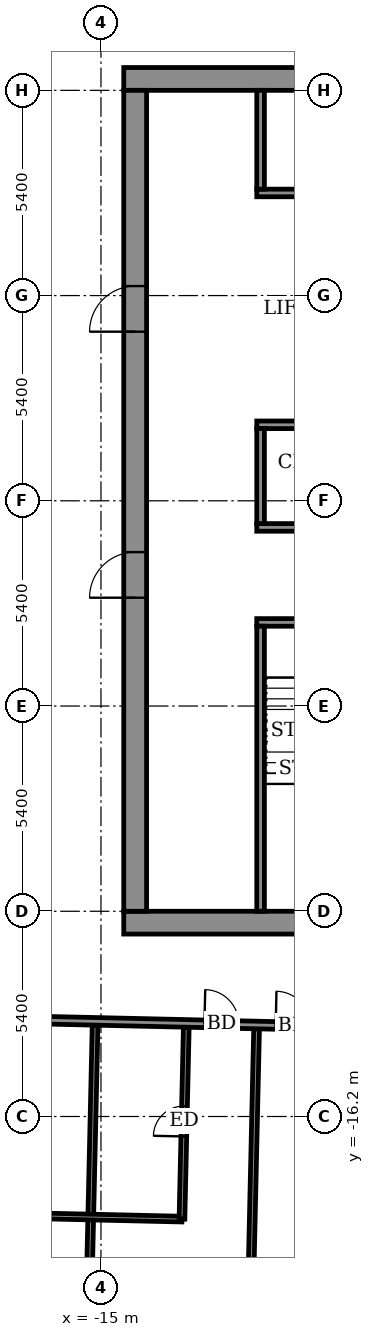
"""IFC4 building model, lengths in metres.
Left out: names, types, materials, properties, quantities, classifications, styles, units other than length and angle.
Written with IfcOpenShell. Run it as: python <this file> out.ifc"""

import sys

from ifc_helpers import new_model, si_unit, direction, frame, frame_2d, origin, place, context, subcontext, project, spatial, rectangle, extrude, element, fill, save


model = new_model("IFC4")
c1 = context("Model", 3, precision=1e-05, world=origin(), true_north=direction((0.0, 1.0)))
c2 = subcontext(c1, "Body", "Model", "MODEL_VIEW")
j1 = project(units=[si_unit("LENGTHUNIT", "METRE"), si_unit("PLANEANGLEUNIT", "RADIAN")], contexts=[c1])
p1 = place(None, origin())
s1 = spatial("IfcSite", under=j1, at=p1, CompositionType="ELEMENT")
p2 = place(p1, origin())
s2 = spatial("IfcBuilding", under=s1, at=p2, CompositionType="ELEMENT")
p3 = place(p2, frame((0.0, 0.0, 309.7)))
s3 = spatial("IfcBuildingStorey", under=s2, at=p3, CompositionType="ELEMENT", Elevation=309.7)
p4 = place(p3, frame((-15.414, -25.244, 0.0), z_axis=(0.0, 0.0, 1.0), x_axis=(0.022706391805, 0.999742176649, 0.0)))
e1 = element("IfcWall", 1, at=p4, inside=s3, PredefinedType="PARTITIONING", context=c2, shape_type="SweptSolid", body=[
    extrude(rectangle(XDim=11.451, YDim=0.15, at=frame_2d((5.726, 0.0))), origin(), (0.0, 0.0, 1.0), 2.5),
])
p5 = place(p3, frame((-11.165, -25.34, 0.0), z_axis=(0.0, 0.0, 1.0), x_axis=(0.022708327922, 0.999742132674, 0.0)))
e2 = element("IfcWall", 2, at=p5, inside=s3, PredefinedType="PARTITIONING", context=c2, shape_type="SweptSolid", body=[
    extrude(rectangle(XDim=11.45, YDim=0.15, at=frame_2d((5.725, 0.0))), origin(), (0.0, 0.0, 1.0), 2.5),
])
p6 = place(p3, frame((-17.668, -18.791, 0.0), z_axis=(0.0, 0.0, 1.0), x_axis=(0.999742701292, -0.022683280499, 0.0)))
e3 = element("IfcWall", 3, at=p6, inside=s3, PredefinedType="PARTITIONING", context=c2, shape_type="SweptSolid", body=[
    extrude(rectangle(XDim=4.8, YDim=0.15, at=frame_2d((2.4, 0.0))), origin(), (0.0, 0.0, 1.0), 3.05),
])
p7 = place(p3, frame((-12.869, -18.9, 0.0), z_axis=(0.0, 0.0, 1.0), x_axis=(0.022576449265, 0.999745119487, 0.0)))
e4 = element("IfcWall", 4, at=p7, inside=s3, PredefinedType="PARTITIONING", context=c2, shape_type="SweptSolid", body=[
    extrude(rectangle(XDim=5.05, YDim=0.15, at=frame_2d((2.525, 0.0))), origin(), (0.0, 0.0, 1.0), 3.05),
])
p8 = place(p7, frame((2.175, 0.0, 0.0)))
e5 = element("IfcOpeningElement", 5, at=p8, cuts=e4, PredefinedType="OPENING", context=c2, shape_type="SweptSolid", body=[
    extrude(rectangle(XDim=0.8, YDim=2.1, at=frame_2d((0.4, 1.05))), frame((0.0, 0.085, 0.0), z_axis=(0.0, -1.0, 0.0), x_axis=(1.0, 0.0, 0.0)), (0.0, 0.0, 1.0), 0.17),
])
p9 = place(p3, frame((-31.347, -13.329, 0.0), z_axis=(0.0, 0.0, 1.0), x_axis=(0.999742613079, -0.022687168058, 0.0)))
e6 = element("IfcWall", 6, at=p9, inside=s3, PredefinedType="PARTITIONING", context=c2, shape_type="SweptSolid", body=[
    extrude(rectangle(XDim=58.799, YDim=0.2, at=frame_2d((29.399, 0.0))), origin(), (0.0, 0.0, 1.0), 3.05),
])
p10 = place(p9, frame((1.35, 0.0, 0.0)))
e7 = element("IfcOpeningElement", 7, at=p10, cuts=e6, PredefinedType="OPENING", context=c2, shape_type="SweptSolid", body=[
    extrude(rectangle(XDim=1.0, YDim=2.1, at=frame_2d((0.5, 1.05))), frame((0.0, 0.11, 0.0), z_axis=(0.0, -1.0, 0.0), x_axis=(1.0, 0.0, 0.0)), (0.0, 0.0, 1.0), 0.22),
])
p11 = place(p9, frame((5.95, 0.0, 0.0)))
e8 = element("IfcOpeningElement", 8, at=p11, cuts=e6, PredefinedType="OPENING", context=c2, shape_type="SweptSolid", body=[
    extrude(rectangle(XDim=0.9, YDim=2.1, at=frame_2d((0.45, 1.05))), frame((0.0, 0.11, 0.0), z_axis=(0.0, -1.0, 0.0), x_axis=(1.0, 0.0, 0.0)), (0.0, 0.0, 1.0), 0.22),
])
p12 = place(p9, frame((10.575, 0.0, 0.0)))
e9 = element("IfcOpeningElement", 9, at=p12, cuts=e6, PredefinedType="OPENING", context=c2, shape_type="SweptSolid", body=[
    extrude(rectangle(XDim=0.9, YDim=2.1, at=frame_2d((0.45, 1.05))), frame((0.0, 0.11, 0.0), z_axis=(0.0, -1.0, 0.0), x_axis=(1.0, 0.0, 0.0)), (0.0, 0.0, 1.0), 0.22),
])
p13 = place(p9, frame((12.425, 0.0, 0.0)))
e10 = element("IfcOpeningElement", 10, at=p13, cuts=e6, PredefinedType="OPENING", context=c2, shape_type="SweptSolid", body=[
    extrude(rectangle(XDim=0.9, YDim=2.1, at=frame_2d((0.45, 1.05))), frame((0.0, 0.11, 0.0), z_axis=(0.0, -1.0, 0.0), x_axis=(1.0, 0.0, 0.0)), (0.0, 0.0, 1.0), 0.22),
])
p14 = place(p9, frame((19.075, 0.0, 0.0)))
e11 = element("IfcOpeningElement", 11, at=p14, cuts=e6, PredefinedType="OPENING", context=c2, shape_type="SweptSolid", body=[
    extrude(rectangle(XDim=0.9, YDim=2.1, at=frame_2d((0.45, 1.05))), frame((0.0, 0.11, 0.0), z_axis=(0.0, -1.0, 0.0), x_axis=(1.0, 0.0, 0.0)), (0.0, 0.0, 1.0), 0.22),
])
p15 = place(p9, frame((20.95, 0.0, 0.0)))
e12 = element("IfcOpeningElement", 12, at=p15, cuts=e6, PredefinedType="OPENING", context=c2, shape_type="SweptSolid", body=[
    extrude(rectangle(XDim=0.9, YDim=2.1, at=frame_2d((0.45, 1.05))), frame((0.0, 0.11, 0.0), z_axis=(0.0, -1.0, 0.0), x_axis=(1.0, 0.0, 0.0)), (0.0, 0.0, 1.0), 0.22),
])
p16 = place(p9, frame((27.625, 0.0, 0.0)))
e13 = element("IfcOpeningElement", 13, at=p16, cuts=e6, PredefinedType="OPENING", context=c2, shape_type="SweptSolid", body=[
    extrude(rectangle(XDim=0.9, YDim=2.1, at=frame_2d((0.45, 1.05))), frame((0.0, 0.11, 0.0), z_axis=(0.0, -1.0, 0.0), x_axis=(1.0, 0.0, 0.0)), (0.0, 0.0, 1.0), 0.22),
])
p17 = place(p9, frame((29.475, 0.0, 0.0)))
e14 = element("IfcOpeningElement", 14, at=p17, cuts=e6, PredefinedType="OPENING", context=c2, shape_type="SweptSolid", body=[
    extrude(rectangle(XDim=0.9, YDim=2.1, at=frame_2d((0.45, 1.05))), frame((0.0, 0.11, 0.0), z_axis=(0.0, -1.0, 0.0), x_axis=(1.0, 0.0, 0.0)), (0.0, 0.0, 1.0), 0.22),
])
p18 = place(p9, frame((36.125, 0.0, 0.0)))
e15 = element("IfcOpeningElement", 15, at=p18, cuts=e6, PredefinedType="OPENING", context=c2, shape_type="SweptSolid", body=[
    extrude(rectangle(XDim=0.9, YDim=2.1, at=frame_2d((0.45, 1.05))), frame((0.0, 0.11, 0.0), z_axis=(0.0, -1.0, 0.0), x_axis=(1.0, 0.0, 0.0)), (0.0, 0.0, 1.0), 0.22),
])
p19 = place(p9, frame((37.95, 0.0, 0.0)))
e16 = element("IfcOpeningElement", 16, at=p19, cuts=e6, PredefinedType="OPENING", context=c2, shape_type="SweptSolid", body=[
    extrude(rectangle(XDim=0.9, YDim=2.1, at=frame_2d((0.45, 1.05))), frame((0.0, 0.11, 0.0), z_axis=(0.0, -1.0, 0.0), x_axis=(1.0, 0.0, 0.0)), (0.0, 0.0, 1.0), 0.22),
])
p20 = place(p9, frame((44.6, 0.0, 0.0)))
e17 = element("IfcOpeningElement", 17, at=p20, cuts=e6, PredefinedType="OPENING", context=c2, shape_type="SweptSolid", body=[
    extrude(rectangle(XDim=0.9, YDim=2.1, at=frame_2d((0.45, 1.05))), frame((0.0, 0.11, 0.0), z_axis=(0.0, -1.0, 0.0), x_axis=(1.0, 0.0, 0.0)), (0.0, 0.0, 1.0), 0.22),
])
p21 = place(p9, frame((46.475, 0.0, 0.0)))
e18 = element("IfcOpeningElement", 18, at=p21, cuts=e6, PredefinedType="OPENING", context=c2, shape_type="SweptSolid", body=[
    extrude(rectangle(XDim=0.9, YDim=2.1, at=frame_2d((0.45, 1.05))), frame((0.0, 0.11, 0.0), z_axis=(0.0, -1.0, 0.0), x_axis=(1.0, 0.0, 0.0)), (0.0, 0.0, 1.0), 0.22),
])
p22 = place(p9, frame((55.925, 0.0, 0.0)))
e19 = element("IfcOpeningElement", 19, at=p22, cuts=e6, PredefinedType="OPENING", context=c2, shape_type="SweptSolid", body=[
    extrude(rectangle(XDim=1.0, YDim=2.1, at=frame_2d((0.5, 1.05))), frame((0.0, 0.11, 0.0), z_axis=(0.0, -1.0, 0.0), x_axis=(1.0, 0.0, 0.0)), (0.0, 0.0, 1.0), 0.22),
])
p23 = place(p9, frame((51.0, 0.0, 0.0)))
e20 = element("IfcOpeningElement", 20, at=p23, cuts=e6, PredefinedType="OPENING", context=c2, shape_type="SweptSolid", body=[
    extrude(rectangle(XDim=0.9, YDim=2.1, at=frame_2d((0.45, 1.05))), frame((0.0, 0.11, 0.0), z_axis=(0.0, -1.0, 0.0), x_axis=(1.0, 0.0, 0.0)), (0.0, 0.0, 1.0), 0.22),
])
for number, where, z_axis, x_axis in (
    (21, (-14.4, -11.1, 0.0), (0.0, 0.0, 1.0), (1.0, 0.0, 0.0)),
    (22, (-14.4, 11.1, 0.0), (0.0, 0.0, 1.0), (1.0, 0.0, 0.0)),
):
    element("IfcWall", number, at=place(p3, frame(where, z_axis=z_axis, x_axis=x_axis)), inside=s3, PredefinedType="SHEAR", context=c2, shape_type="SweptSolid", body=[
        extrude(rectangle(XDim=28.8, YDim=0.6, at=frame_2d((14.4, 0.0))), origin(), (0.0, 0.0, 1.0), 3.6),
    ])
p24 = place(p3, frame((-14.1, -10.8, 0.0), z_axis=(0.0, 0.0, 1.0), x_axis=(0.0, 1.0, 0.0)))
e23 = element("IfcWall", 23, at=p24, inside=s3, PredefinedType="SHEAR", context=c2, shape_type="SweptSolid", body=[
    extrude(rectangle(XDim=21.6, YDim=0.6, at=frame_2d((10.8, 0.0))), origin(), (0.0, 0.0, 1.0), 3.6),
])
p25 = place(p24, frame((8.25, 0.0, 0.0)))
e24 = element("IfcOpeningElement", 24, at=p25, cuts=e23, PredefinedType="OPENING", context=c2, shape_type="SweptSolid", body=[
    extrude(rectangle(XDim=1.2, YDim=2.1, at=frame_2d((0.6, 1.05))), frame((0.0, 0.31, 0.0), z_axis=(0.0, -1.0, 0.0), x_axis=(1.0, 0.0, 0.0)), (0.0, 0.0, 1.0), 0.62),
])
p26 = place(p24, frame((15.25, 0.0, 0.0)))
e25 = element("IfcOpeningElement", 25, at=p26, cuts=e23, PredefinedType="OPENING", context=c2, shape_type="SweptSolid", body=[
    extrude(rectangle(XDim=1.2, YDim=2.1, at=frame_2d((0.6, 1.05))), frame((0.0, 0.31, 0.0), z_axis=(0.0, -1.0, 0.0), x_axis=(1.0, 0.0, 0.0)), (0.0, 0.0, 1.0), 0.62),
])
p27 = place(p3, frame((-10.9, -3.2, 0.0), z_axis=(0.0, 0.0, 1.0), x_axis=(1.0, 0.0, 0.0)))
e26 = element("IfcWall", 26, at=p27, inside=s3, PredefinedType="SHEAR", context=c2, shape_type="SweptSolid", body=[
    extrude(rectangle(XDim=21.8, YDim=0.2, at=frame_2d((10.9, 0.0))), origin(), (0.0, 0.0, 1.0), 3.05),
])
p28 = place(p27, frame((1.075, 0.0, 0.0)))
e27 = element("IfcOpeningElement", 27, at=p28, cuts=e26, PredefinedType="OPENING", context=c2, shape_type="SweptSolid", body=[
    extrude(rectangle(XDim=1.1, YDim=2.1, at=frame_2d((0.55, 1.05))), frame((0.0, 0.11, 0.0), z_axis=(0.0, -1.0, 0.0), x_axis=(1.0, 0.0, 0.0)), (0.0, 0.0, 1.0), 0.22),
])
p29 = place(p27, frame((10.325, 0.0, 0.0)))
e28 = element("IfcOpeningElement", 28, at=p29, cuts=e26, PredefinedType="OPENING", context=c2, shape_type="SweptSolid", body=[
    extrude(rectangle(XDim=1.1, YDim=2.1, at=frame_2d((0.55, 1.05))), frame((0.0, 0.11, 0.0), z_axis=(0.0, -1.0, 0.0), x_axis=(1.0, 0.0, 0.0)), (0.0, 0.0, 1.0), 0.22),
])
p30 = place(p27, frame((19.625, 0.0, 0.0)))
e29 = element("IfcOpeningElement", 29, at=p30, cuts=e26, PredefinedType="OPENING", context=c2, shape_type="SweptSolid", body=[
    extrude(rectangle(XDim=1.1, YDim=2.1, at=frame_2d((0.55, 1.05))), frame((0.0, 0.11, 0.0), z_axis=(0.0, -1.0, 0.0), x_axis=(1.0, 0.0, 0.0)), (0.0, 0.0, 1.0), 0.22),
])
p31 = place(p27, frame((5.7, 0.0, 0.0)))
e30 = element("IfcOpeningElement", 30, at=p31, cuts=e26, PredefinedType="OPENING", context=c2, shape_type="SweptSolid", body=[
    extrude(rectangle(XDim=1.1, YDim=2.1, at=frame_2d((0.55, 1.05))), frame((0.0, 0.11, 0.0), z_axis=(0.0, -1.0, 0.0), x_axis=(1.0, 0.0, 0.0)), (0.0, 0.0, 1.0), 0.22),
])
p32 = place(p27, frame((14.975, 0.0, 0.0)))
e31 = element("IfcOpeningElement", 31, at=p32, cuts=e26, PredefinedType="OPENING", context=c2, shape_type="SweptSolid", body=[
    extrude(rectangle(XDim=1.1, YDim=2.1, at=frame_2d((0.55, 1.05))), frame((0.0, 0.11, 0.0), z_axis=(0.0, -1.0, 0.0), x_axis=(1.0, 0.0, 0.0)), (0.0, 0.0, 1.0), 0.22),
])
p33 = place(p3, frame((-10.9, -0.7, 0.0), z_axis=(0.0, 0.0, 1.0), x_axis=(1.0, 0.0, 0.0)))
e32 = element("IfcWall", 32, at=p33, inside=s3, PredefinedType="SHEAR", context=c2, shape_type="SweptSolid", body=[
    extrude(rectangle(XDim=21.8, YDim=0.2, at=frame_2d((10.9, 0.0))), origin(), (0.0, 0.0, 1.0), 3.05),
])
p34 = place(p3, frame((-10.9, 2.0, 0.0), z_axis=(0.0, 0.0, 1.0), x_axis=(1.0, 0.0, 0.0)))
e33 = element("IfcWall", 33, at=p34, inside=s3, PredefinedType="SHEAR", context=c2, shape_type="SweptSolid", body=[
    extrude(rectangle(XDim=21.8, YDim=0.2, at=frame_2d((10.9, 0.0))), origin(), (0.0, 0.0, 1.0), 3.05),
])
p35 = place(p34, frame((4.95, 0.0, 0.0)))
e34 = element("IfcOpeningElement", 34, at=p35, cuts=e33, PredefinedType="OPENING", context=c2, shape_type="SweptSolid", body=[
    extrude(rectangle(XDim=1.1, YDim=2.1, at=frame_2d((0.55, 1.05))), frame((0.0, 0.11, 0.0), z_axis=(0.0, -1.0, 0.0), x_axis=(1.0, 0.0, 0.0)), (0.0, 0.0, 1.0), 0.22),
])
p36 = place(p34, frame((7.65, 0.0, 0.0)))
e35 = element("IfcOpeningElement", 35, at=p36, cuts=e33, PredefinedType="OPENING", context=c2, shape_type="SweptSolid", body=[
    extrude(rectangle(XDim=1.1, YDim=2.1, at=frame_2d((0.55, 1.05))), frame((0.0, 0.11, 0.0), z_axis=(0.0, -1.0, 0.0), x_axis=(1.0, 0.0, 0.0)), (0.0, 0.0, 1.0), 0.22),
])
p37 = place(p34, frame((10.35, 0.0, 0.0)))
e36 = element("IfcOpeningElement", 36, at=p37, cuts=e33, PredefinedType="OPENING", context=c2, shape_type="SweptSolid", body=[
    extrude(rectangle(XDim=1.1, YDim=2.1, at=frame_2d((0.55, 1.05))), frame((0.0, 0.11, 0.0), z_axis=(0.0, -1.0, 0.0), x_axis=(1.0, 0.0, 0.0)), (0.0, 0.0, 1.0), 0.22),
])
p38 = place(p34, frame((1.675, 0.0, 0.0)))
e37 = element("IfcOpeningElement", 37, at=p38, cuts=e33, PredefinedType="OPENING", context=c2, shape_type="SweptSolid", body=[
    extrude(rectangle(XDim=0.9, YDim=2.1, at=frame_2d((0.45, 1.05))), frame((0.0, 0.11, 0.0), z_axis=(0.0, -1.0, 0.0), x_axis=(1.0, 0.0, 0.0)), (0.0, 0.0, 1.0), 0.22),
])
p39 = place(p34, frame((14.5, 0.0, 0.0)))
e38 = element("IfcOpeningElement", 38, at=p39, cuts=e33, PredefinedType="OPENING", context=c2, shape_type="SweptSolid", body=[
    extrude(rectangle(XDim=0.9, YDim=2.1, at=frame_2d((0.45, 1.05))), frame((0.0, 0.11, 0.0), z_axis=(0.0, -1.0, 0.0), x_axis=(1.0, 0.0, 0.0)), (0.0, 0.0, 1.0), 0.22),
])
p40 = place(p34, frame((19.225, 0.0, 0.0)))
e39 = element("IfcOpeningElement", 39, at=p40, cuts=e33, PredefinedType="OPENING", context=c2, shape_type="SweptSolid", body=[
    extrude(rectangle(XDim=0.9, YDim=2.1, at=frame_2d((0.45, 1.05))), frame((0.0, 0.11, 0.0), z_axis=(0.0, -1.0, 0.0), x_axis=(1.0, 0.0, 0.0)), (0.0, 0.0, 1.0), 0.22),
])
p41 = place(p3, frame((-10.9, 8.1, 0.0), z_axis=(0.0, 0.0, 1.0), x_axis=(1.0, 0.0, 0.0)))
e40 = element("IfcWall", 40, at=p41, inside=s3, PredefinedType="SHEAR", context=c2, shape_type="SweptSolid", body=[
    extrude(rectangle(XDim=21.8, YDim=0.2, at=frame_2d((10.9, 0.0))), origin(), (0.0, 0.0, 1.0), 3.05),
])
p42 = place(p41, frame((4.95, 0.0, 0.0)))
e41 = element("IfcOpeningElement", 41, at=p42, cuts=e40, PredefinedType="OPENING", context=c2, shape_type="SweptSolid", body=[
    extrude(rectangle(XDim=1.1, YDim=2.1, at=frame_2d((0.55, 1.05))), frame((0.0, 0.11, 0.0), z_axis=(0.0, -1.0, 0.0), x_axis=(1.0, 0.0, 0.0)), (0.0, 0.0, 1.0), 0.22),
])
p43 = place(p41, frame((7.65, 0.0, 0.0)))
e42 = element("IfcOpeningElement", 42, at=p43, cuts=e40, PredefinedType="OPENING", context=c2, shape_type="SweptSolid", body=[
    extrude(rectangle(XDim=1.1, YDim=2.1, at=frame_2d((0.55, 1.05))), frame((0.0, 0.11, 0.0), z_axis=(0.0, -1.0, 0.0), x_axis=(1.0, 0.0, 0.0)), (0.0, 0.0, 1.0), 0.22),
])
p44 = place(p41, frame((10.35, 0.0, 0.0)))
e43 = element("IfcOpeningElement", 43, at=p44, cuts=e40, PredefinedType="OPENING", context=c2, shape_type="SweptSolid", body=[
    extrude(rectangle(XDim=1.1, YDim=2.1, at=frame_2d((0.55, 1.05))), frame((0.0, 0.11, 0.0), z_axis=(0.0, -1.0, 0.0), x_axis=(1.0, 0.0, 0.0)), (0.0, 0.0, 1.0), 0.22),
])
p45 = place(p41, frame((1.675, 0.0, 0.0)))
e44 = element("IfcOpeningElement", 44, at=p45, cuts=e40, PredefinedType="OPENING", context=c2, shape_type="SweptSolid", body=[
    extrude(rectangle(XDim=0.9, YDim=2.1, at=frame_2d((0.45, 1.05))), frame((0.0, 0.11, 0.0), z_axis=(0.0, -1.0, 0.0), x_axis=(1.0, 0.0, 0.0)), (0.0, 0.0, 1.0), 0.22),
])
p46 = place(p41, frame((14.5, 0.0, 0.0)))
e45 = element("IfcOpeningElement", 45, at=p46, cuts=e40, PredefinedType="OPENING", context=c2, shape_type="SweptSolid", body=[
    extrude(rectangle(XDim=0.9, YDim=2.1, at=frame_2d((0.45, 1.05))), frame((0.0, 0.11, 0.0), z_axis=(0.0, -1.0, 0.0), x_axis=(1.0, 0.0, 0.0)), (0.0, 0.0, 1.0), 0.22),
])
p47 = place(p41, frame((19.225, 0.0, 0.0)))
e46 = element("IfcOpeningElement", 46, at=p47, cuts=e40, PredefinedType="OPENING", context=c2, shape_type="SweptSolid", body=[
    extrude(rectangle(XDim=0.9, YDim=2.1, at=frame_2d((0.45, 1.05))), frame((0.0, 0.11, 0.0), z_axis=(0.0, -1.0, 0.0), x_axis=(1.0, 0.0, 0.0)), (0.0, 0.0, 1.0), 0.22),
])
p48 = place(p3, frame((-10.8, -10.8, 0.0), z_axis=(0.0, 0.0, 1.0), x_axis=(0.0, 1.0, 0.0)))
e47 = element("IfcWall", 47, at=p48, inside=s3, PredefinedType="SHEAR", context=c2, shape_type="SweptSolid", body=[
    extrude(rectangle(XDim=7.5, YDim=0.2, at=frame_2d((3.75, 0.0))), origin(), (0.0, 0.0, 1.0), 3.05),
])
p49 = place(p3, frame((-10.8, -0.6, 0.0), z_axis=(0.0, 0.0, 1.0), x_axis=(0.0, 1.0, 0.0)))
e48 = element("IfcWall", 48, at=p49, inside=s3, PredefinedType="STANDARD", context=c2, shape_type="SweptSolid", body=[
    extrude(rectangle(XDim=2.5, YDim=0.2, at=frame_2d((1.25, 0.0))), origin(), (0.0, 0.0, 1.0), 3.05),
])
p50 = place(p3, frame((-10.8, 8.2, 0.0), z_axis=(0.0, 0.0, 1.0), x_axis=(0.0, 1.0, 0.0)))
e49 = element("IfcWall", 49, at=p50, inside=s3, PredefinedType="STANDARD", context=c2, shape_type="SweptSolid", body=[
    extrude(rectangle(XDim=2.6, YDim=0.2, at=frame_2d((1.3, 0.0))), origin(), (0.0, 0.0, 1.0), 3.05),
])
p51 = place(p14, origin())
e50 = element("IfcDoor", 50, at=p51, inside=s3, OperationType="SINGLE_SWING_LEFT", PredefinedType="DOOR", context=c2, shape_type="SweptSolid", body=[
    extrude(rectangle(XDim=0.9, YDim=2.1, at=frame_2d((0.45, 1.05))), frame((0.0, 0.025, 0.0), z_axis=(0.0, -1.0, 0.0), x_axis=(1.0, 0.0, 0.0)), (0.0, 0.0, 1.0), 0.05),
])
fill(e11, e50)
p52 = place(p8, origin())
e51 = element("IfcDoor", 51, at=p52, inside=s3, OperationType="SINGLE_SWING_LEFT", PredefinedType="DOOR", context=c2, shape_type="SweptSolid", body=[
    extrude(rectangle(XDim=0.8, YDim=2.1, at=frame_2d((0.4, 1.05))), frame((0.0, 0.025, 0.0), z_axis=(0.0, -1.0, 0.0), x_axis=(1.0, 0.0, 0.0)), (0.0, 0.0, 1.0), 0.05),
])
fill(e5, e51)
p53 = place(p15, origin())
e52 = element("IfcDoor", 52, at=p53, inside=s3, OperationType="SINGLE_SWING_RIGHT", PredefinedType="DOOR", context=c2, shape_type="SweptSolid", body=[
    extrude(rectangle(XDim=0.9, YDim=2.1, at=frame_2d((0.45, 1.05))), frame((0.0, 0.025, 0.0), z_axis=(0.0, -1.0, 0.0), x_axis=(1.0, 0.0, 0.0)), (0.0, 0.0, 1.0), 0.05),
])
fill(e12, e52)
p54 = place(p25, origin())
e53 = element("IfcDoor", 53, at=p54, inside=s3, OperationType="DOUBLE_DOOR_SINGLE_SWING", PredefinedType="DOOR", context=c2, shape_type="SweptSolid", body=[
    extrude(rectangle(XDim=1.2, YDim=2.1, at=frame_2d((0.6, 1.05))), frame((0.0, 0.025, 0.0), z_axis=(0.0, -1.0, 0.0), x_axis=(1.0, 0.0, 0.0)), (0.0, 0.0, 1.0), 0.05),
])
fill(e24, e53)
p55 = place(p26, origin())
e54 = element("IfcDoor", 54, at=p55, inside=s3, OperationType="DOUBLE_DOOR_SINGLE_SWING", PredefinedType="DOOR", context=c2, shape_type="SweptSolid", body=[
    extrude(rectangle(XDim=1.2, YDim=2.1, at=frame_2d((0.6, 1.05))), frame((0.0, 0.025, 0.0), z_axis=(0.0, -1.0, 0.0), x_axis=(1.0, 0.0, 0.0)), (0.0, 0.0, 1.0), 0.05),
])
fill(e25, e54)
save(model, sys.argv[1])
